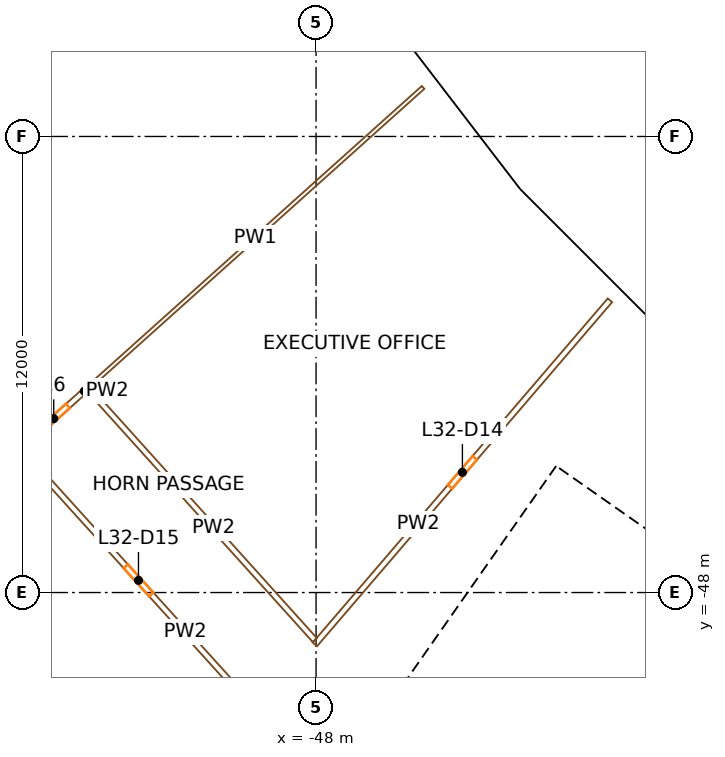
"""IFC4 building model, lengths in metres.
Left out: names, types, materials, properties, quantities, classifications, styles, units other than length and angle.
Written with IfcOpenShell. Run it as: python <this file> out.ifc"""

import sys

from ifc_helpers import new_model, si_unit, direction, frame, frame_2d, origin, origin_2d, place, context, subcontext, project, spatial, rectangle, extrude, element, fill, save


model = new_model("IFC4")
c1 = context("Model", 3, precision=1e-05, world=origin(), true_north=direction((0.0, 1.0)))
c2 = subcontext(c1, "Body", "Model", "MODEL_VIEW")
j1 = project(units=[si_unit("LENGTHUNIT", "METRE"), si_unit("PLANEANGLEUNIT", "RADIAN")], contexts=[c1])
p1 = place(None, origin())
s1 = spatial("IfcSite", under=j1, at=p1, CompositionType="ELEMENT")
p2 = place(p1, origin())
s2 = spatial("IfcBuilding", under=s1, at=p2, CompositionType="ELEMENT")
p3 = place(p2, frame((0.0, 0.0, 140.5)))
s3 = spatial("IfcBuildingStorey", under=s2, at=p3, CompositionType="ELEMENT", Elevation=140.5)
for number, where, z_axis, x_axis in (
    (1, (-43.795, -38.407, 0.0), (0.0, 0.0, 1.0), (0.659, -0.752, 0.0)),
    (2, (-38.407, -43.795, 0.0), (0.0, 0.0, 1.0), (0.752, -0.659, 0.0)),
):
    element("IfcColumn", number, at=place(p3, frame(where, z_axis=z_axis, x_axis=x_axis)), inside=s3, PredefinedType="COLUMN", context=c2, shape_type="SweptSolid", body=[
        extrude(rectangle(XDim=1.2, YDim=1.5, at=origin_2d()), origin(), (0.0, 0.0, 1.0), 3.8),
    ])
p4 = place(p3, frame((-49.779, -57.191, 0.0), z_axis=(0.0, 0.0, 1.0), x_axis=(0.573577477574, 0.819151315216, 0.0)))
e3 = element("IfcWall", 3, at=p4, inside=s3, PredefinedType="SHEAR", context=c2, shape_type="SweptSolid", body=[
    extrude(rectangle(XDim=14.8, YDim=0.9, at=frame_2d((7.4, 0.0))), origin(), (0.0, 0.0, 1.0), 3.4),
])
p5 = place(p4, frame((6.7, 0.0, 0.0)))
e4 = element("IfcOpeningElement", 4, at=p5, cuts=e3, PredefinedType="OPENING", context=c2, shape_type="SweptSolid", body=[
    extrude(rectangle(XDim=1.4, YDim=2.1, at=frame_2d((0.7, 1.05))), frame((0.0, 0.46, 0.0), z_axis=(0.0, -1.0, 0.0), x_axis=(1.0, 0.0, 0.0)), (0.0, 0.0, 1.0), 0.92),
])
p6 = place(p3, frame((-28.854, -54.324, 0.0), z_axis=(0.0, 0.0, 1.0), x_axis=(-0.819145767589, 0.573585400304, 0.0)))
e5 = element("IfcWall", 5, at=p6, inside=s3, PredefinedType="SHEAR", context=c2, shape_type="SweptSolid", body=[
    extrude(rectangle(XDim=15.045, YDim=0.9, at=frame_2d((7.523, 0.0))), origin(), (0.0, 0.0, 1.0), 3.4),
])
p7 = place(p6, frame((0.9, 0.0, 0.0)))
e6 = element("IfcOpeningElement", 6, at=p7, cuts=e5, PredefinedType="OPENING", context=c2, shape_type="SweptSolid", body=[
    extrude(rectangle(XDim=1.0, YDim=2.1, at=frame_2d((0.5, 1.05))), frame((0.0, 0.46, 0.0), z_axis=(0.0, -1.0, 0.0), x_axis=(1.0, 0.0, 0.0)), (0.0, 0.0, 1.0), 0.92),
])
p8 = place(p6, frame((4.975, 0.0, 0.0)))
e7 = element("IfcOpeningElement", 7, at=p8, cuts=e5, PredefinedType="OPENING", context=c2, shape_type="SweptSolid", body=[
    extrude(rectangle(XDim=0.9, YDim=2.1, at=frame_2d((0.45, 1.05))), frame((0.0, 0.46, 0.0), z_axis=(0.0, -1.0, 0.0), x_axis=(1.0, 0.0, 0.0)), (0.0, 0.0, 1.0), 0.92),
])
p9 = place(p6, frame((13.495, 0.0, 0.0)))
e8 = element("IfcOpeningElement", 8, at=p9, cuts=e5, PredefinedType="OPENING", context=c2, shape_type="SweptSolid", body=[
    extrude(rectangle(XDim=1.1, YDim=2.1, at=frame_2d((0.55, 1.05))), frame((0.0, 0.46, 0.0), z_axis=(0.0, -1.0, 0.0), x_axis=(1.0, 0.0, 0.0)), (0.0, 0.0, 1.0), 0.92),
])
p10 = place(p3, frame((-43.204, -60.696, 0.0), z_axis=(0.0, 0.0, 1.0), x_axis=(0.573571992966, 0.819155155563, 0.0)))
e9 = element("IfcWall", 9, at=p10, inside=s3, PredefinedType="SOLIDWALL", context=c2, shape_type="SweptSolid", body=[
    extrude(rectangle(XDim=13.0, YDim=0.3, at=frame_2d((6.5, 0.0))), origin(), (0.0, 0.0, 1.0), 3.4),
])
p11 = place(p3, frame((-37.936, -52.91, 0.0), z_axis=(0.0, 0.0, 1.0), x_axis=(-0.819147518138, 0.57358290031, 0.0)))
e10 = element("IfcWall", 10, at=p11, inside=s3, PredefinedType="SOLIDWALL", context=c2, shape_type="SweptSolid", body=[
    extrude(rectangle(XDim=6.795, YDim=0.3, at=frame_2d((3.398, 0.0))), origin(), (0.0, 0.0, 1.0), 3.4),
])
p12 = place(p11, frame((5.32, 0.0, 0.0)))
e11 = element("IfcOpeningElement", 11, at=p12, cuts=e10, PredefinedType="OPENING", context=c2, shape_type="SweptSolid", body=[
    extrude(rectangle(XDim=1.1, YDim=2.1, at=frame_2d((0.55, 1.05))), frame((0.0, 0.16, 0.0), z_axis=(0.0, -1.0, 0.0), x_axis=(1.0, 0.0, 0.0)), (0.0, 0.0, 1.0), 0.32),
])
p13 = place(p3, frame((-42.765, -37.537, 0.0), z_axis=(0.0, 0.0, 1.0), x_axis=(-0.608748204711, 0.793363487476, 0.0)))
e12 = element("IfcWall", 12, at=p13, inside=s3, PredefinedType="SOLIDWALL", context=c2, shape_type="SweptSolid", body=[
    extrude(rectangle(XDim=7.493, YDim=0.4, at=frame_2d((3.747, 0.0))), origin(), (0.0, 0.0, 1.0), 2.7),
])
p14 = place(p13, frame((4.301, 0.0, 0.9)))
e13 = element("IfcOpeningElement", 13, at=p14, cuts=e12, PredefinedType="OPENING", context=c2, shape_type="SweptSolid", body=[
    extrude(rectangle(XDim=2.6, YDim=1.65, at=frame_2d((1.3, 0.825))), frame((0.0, 0.21, 0.0), z_axis=(0.0, -1.0, 0.0), x_axis=(1.0, 0.0, 0.0)), (0.0, 0.0, 1.0), 0.42),
])
p15 = place(p13, frame((0.592, 0.0, 0.9)))
e14 = element("IfcOpeningElement", 14, at=p15, cuts=e12, PredefinedType="OPENING", context=c2, shape_type="SweptSolid", body=[
    extrude(rectangle(XDim=2.6, YDim=1.65, at=frame_2d((1.3, 0.825))), frame((0.0, 0.21, 0.0), z_axis=(0.0, -1.0, 0.0), x_axis=(1.0, 0.0, 0.0)), (0.0, 0.0, 1.0), 0.42),
])
p16 = place(p3, frame((-37.553, -42.744, 0.0), z_axis=(0.0, 0.0, 1.0), x_axis=(-0.707106781187, 0.707106781187, 0.0)))
e15 = element("IfcWall", 15, at=p16, inside=s3, PredefinedType="SOLIDWALL", context=c2, shape_type="SweptSolid", body=[
    extrude(rectangle(XDim=7.341, YDim=0.4, at=frame_2d((3.671, 0.0))), origin(), (0.0, 0.0, 1.0), 2.7),
])
p17 = place(p16, frame((4.225, 0.0, 0.9)))
e16 = element("IfcOpeningElement", 16, at=p17, cuts=e15, PredefinedType="OPENING", context=c2, shape_type="SweptSolid", body=[
    extrude(rectangle(XDim=2.6, YDim=1.65, at=frame_2d((1.3, 0.825))), frame((0.0, 0.21, 0.0), z_axis=(0.0, -1.0, 0.0), x_axis=(1.0, 0.0, 0.0)), (0.0, 0.0, 1.0), 0.42),
])
p18 = place(p16, frame((0.517, 0.0, 0.9)))
e17 = element("IfcOpeningElement", 17, at=p18, cuts=e15, PredefinedType="OPENING", context=c2, shape_type="SweptSolid", body=[
    extrude(rectangle(XDim=2.6, YDim=1.65, at=frame_2d((1.3, 0.825))), frame((0.0, 0.21, 0.0), z_axis=(0.0, -1.0, 0.0), x_axis=(1.0, 0.0, 0.0)), (0.0, 0.0, 1.0), 0.42),
])
p19 = place(p3, frame((-55.798, -44.227, 0.0), z_axis=(0.0, 0.0, 1.0), x_axis=(0.744539856865, 0.667578011576, 0.0)))
e18 = element("IfcWall", 18, at=p19, inside=s3, PredefinedType="PARTITIONING", context=c2, shape_type="SweptSolid", body=[
    extrude(rectangle(XDim=2.405, YDim=0.15, at=frame_2d((1.202, 0.0))), origin(), (0.0, 0.0, 1.0), 2.4),
])
p20 = place(p19, frame((0.702, 0.0, 0.0)))
e19 = element("IfcOpeningElement", 19, at=p20, cuts=e18, PredefinedType="OPENING", context=c2, shape_type="SweptSolid", body=[
    extrude(rectangle(XDim=1.0, YDim=2.1, at=frame_2d((0.5, 1.05))), frame((0.0, 0.085, 0.0), z_axis=(0.0, -1.0, 0.0), x_axis=(1.0, 0.0, 0.0)), (0.0, 0.0, 1.0), 0.17),
])
p21 = place(p3, frame((-54.008, -42.622, 0.0), z_axis=(0.0, 0.0, 1.0), x_axis=(0.744502704069, 0.667619445219, 0.0)))
e20 = element("IfcWall", 20, at=p21, inside=s3, PredefinedType="PARTITIONING", context=c2, shape_type="SweptSolid", body=[
    extrude(rectangle(XDim=11.851, YDim=0.1, at=frame_2d((5.925, 0.0))), origin(), (0.0, 0.0, 1.0), 2.4),
])
p22 = place(p3, frame((-49.598, -51.076, 0.0), z_axis=(0.0, 0.0, 1.0), x_axis=(-0.671105149511, 0.741362177549, 0.0)))
e21 = element("IfcWall", 21, at=p22, inside=s3, PredefinedType="PARTITIONING", context=c2, shape_type="SweptSolid", body=[
    extrude(rectangle(XDim=9.164, YDim=0.15, at=frame_2d((4.582, 0.0))), origin(), (0.0, 0.0, 1.0), 2.4),
])
p23 = place(p22, frame((4.082, 0.0, 0.0)))
e22 = element("IfcOpeningElement", 22, at=p23, cuts=e21, PredefinedType="OPENING", context=c2, shape_type="SweptSolid", body=[
    extrude(rectangle(XDim=1.0, YDim=2.1, at=frame_2d((0.5, 1.05))), frame((0.0, 0.085, 0.0), z_axis=(0.0, -1.0, 0.0), x_axis=(1.0, 0.0, 0.0)), (0.0, 0.0, 1.0), 0.17),
])
p24 = place(p3, frame((-48.032, -49.251, 0.0), z_axis=(0.0, 0.0, 1.0), x_axis=(-0.669505645027, 0.742806967709, 0.0)))
e23 = element("IfcWall", 23, at=p24, inside=s3, PredefinedType="PARTITIONING", context=c2, shape_type="SweptSolid", body=[
    extrude(rectangle(XDim=8.85, YDim=0.15, at=frame_2d((4.425, 0.0))), origin(), (0.0, 0.0, 1.0), 2.4),
])
p25 = place(p3, frame((-48.031, -49.364, 0.0), z_axis=(0.0, 0.0, 1.0), x_axis=(0.650981860867, 0.759093285982, 0.0)))
e24 = element("IfcWall", 24, at=p25, inside=s3, PredefinedType="PARTITIONING", context=c2, shape_type="SweptSolid", body=[
    extrude(rectangle(XDim=11.926, YDim=0.15, at=frame_2d((5.963, 0.0))), origin(), (0.0, 0.0, 1.0), 2.4),
])
p26 = place(p25, frame((5.463, 0.0, 0.0)))
e25 = element("IfcOpeningElement", 25, at=p26, cuts=e24, PredefinedType="OPENING", context=c2, shape_type="SweptSolid", body=[
    extrude(rectangle(XDim=1.0, YDim=2.1, at=frame_2d((0.5, 1.05))), frame((0.0, 0.085, 0.0), z_axis=(0.0, -1.0, 0.0), x_axis=(1.0, 0.0, 0.0)), (0.0, 0.0, 1.0), 0.17),
])
p27 = place(p9, origin())
e26 = element("IfcDoor", 26, at=p27, inside=s3, OperationType="SINGLE_SWING_RIGHT", PredefinedType="DOOR", context=c2, shape_type="SweptSolid", body=[
    extrude(rectangle(XDim=1.1, YDim=2.1, at=frame_2d((0.55, 1.05))), frame((0.0, 0.025, 0.0), z_axis=(0.0, -1.0, 0.0), x_axis=(1.0, 0.0, 0.0)), (0.0, 0.0, 1.0), 0.05),
])
fill(e8, e26)
p28 = place(p12, origin())
e27 = element("IfcDoor", 27, at=p28, inside=s3, OperationType="SINGLE_SWING_RIGHT", PredefinedType="DOOR", context=c2, shape_type="SweptSolid", body=[
    extrude(rectangle(XDim=1.1, YDim=2.1, at=frame_2d((0.55, 1.05))), frame((0.0, 0.025, 0.0), z_axis=(0.0, -1.0, 0.0), x_axis=(1.0, 0.0, 0.0)), (0.0, 0.0, 1.0), 0.05),
])
fill(e11, e27)
p29 = place(p14, origin())
e28 = element("IfcWindow", 28, at=p29, inside=s3, PartitioningType="SINGLE_PANEL", PredefinedType="WINDOW", context=c2, shape_type="SweptSolid", body=[
    extrude(rectangle(XDim=2.6, YDim=1.65, at=frame_2d((1.3, 0.825))), frame((0.0, 0.03, 0.0), z_axis=(0.0, -1.0, 0.0), x_axis=(1.0, 0.0, 0.0)), (0.0, 0.0, 1.0), 0.06),
])
fill(e13, e28)
p30 = place(p15, origin())
e29 = element("IfcWindow", 29, at=p30, inside=s3, PartitioningType="SINGLE_PANEL", PredefinedType="WINDOW", context=c2, shape_type="SweptSolid", body=[
    extrude(rectangle(XDim=2.6, YDim=1.65, at=frame_2d((1.3, 0.825))), frame((0.0, 0.03, 0.0), z_axis=(0.0, -1.0, 0.0), x_axis=(1.0, 0.0, 0.0)), (0.0, 0.0, 1.0), 0.06),
])
fill(e14, e29)
p31 = place(p17, origin())
e30 = element("IfcWindow", 30, at=p31, inside=s3, PartitioningType="SINGLE_PANEL", PredefinedType="WINDOW", context=c2, shape_type="SweptSolid", body=[
    extrude(rectangle(XDim=2.6, YDim=1.65, at=frame_2d((1.3, 0.825))), frame((0.0, 0.03, 0.0), z_axis=(0.0, -1.0, 0.0), x_axis=(1.0, 0.0, 0.0)), (0.0, 0.0, 1.0), 0.06),
])
fill(e16, e30)
p32 = place(p18, origin())
e31 = element("IfcWindow", 31, at=p32, inside=s3, PartitioningType="SINGLE_PANEL", PredefinedType="WINDOW", context=c2, shape_type="SweptSolid", body=[
    extrude(rectangle(XDim=2.6, YDim=1.65, at=frame_2d((1.3, 0.825))), frame((0.0, 0.03, 0.0), z_axis=(0.0, -1.0, 0.0), x_axis=(1.0, 0.0, 0.0)), (0.0, 0.0, 1.0), 0.06),
])
fill(e17, e31)
p33 = place(p26, origin())
e32 = element("IfcDoor", 32, at=p33, inside=s3, OperationType="SINGLE_SWING_RIGHT", PredefinedType="DOOR", context=c2, shape_type="SweptSolid", body=[
    extrude(rectangle(XDim=1.0, YDim=2.1, at=frame_2d((0.5, 1.05))), frame((0.0, 0.025, 0.0), z_axis=(0.0, -1.0, 0.0), x_axis=(1.0, 0.0, 0.0)), (0.0, 0.0, 1.0), 0.05),
])
fill(e25, e32)
p34 = place(p23, origin())
e33 = element("IfcDoor", 33, at=p34, inside=s3, OperationType="SINGLE_SWING_RIGHT", PredefinedType="DOOR", context=c2, shape_type="SweptSolid", body=[
    extrude(rectangle(XDim=1.0, YDim=2.1, at=frame_2d((0.5, 1.05))), frame((0.0, 0.025, 0.0), z_axis=(0.0, -1.0, 0.0), x_axis=(1.0, 0.0, 0.0)), (0.0, 0.0, 1.0), 0.05),
])
fill(e22, e33)
p35 = place(p20, origin())
e34 = element("IfcDoor", 34, at=p35, inside=s3, OperationType="SINGLE_SWING_RIGHT", PredefinedType="DOOR", context=c2, shape_type="SweptSolid", body=[
    extrude(rectangle(XDim=1.0, YDim=2.1, at=frame_2d((0.5, 1.05))), frame((0.0, 0.025, 0.0), z_axis=(0.0, -1.0, 0.0), x_axis=(1.0, 0.0, 0.0)), (0.0, 0.0, 1.0), 0.05),
])
fill(e19, e34)
save(model, sys.argv[1])
